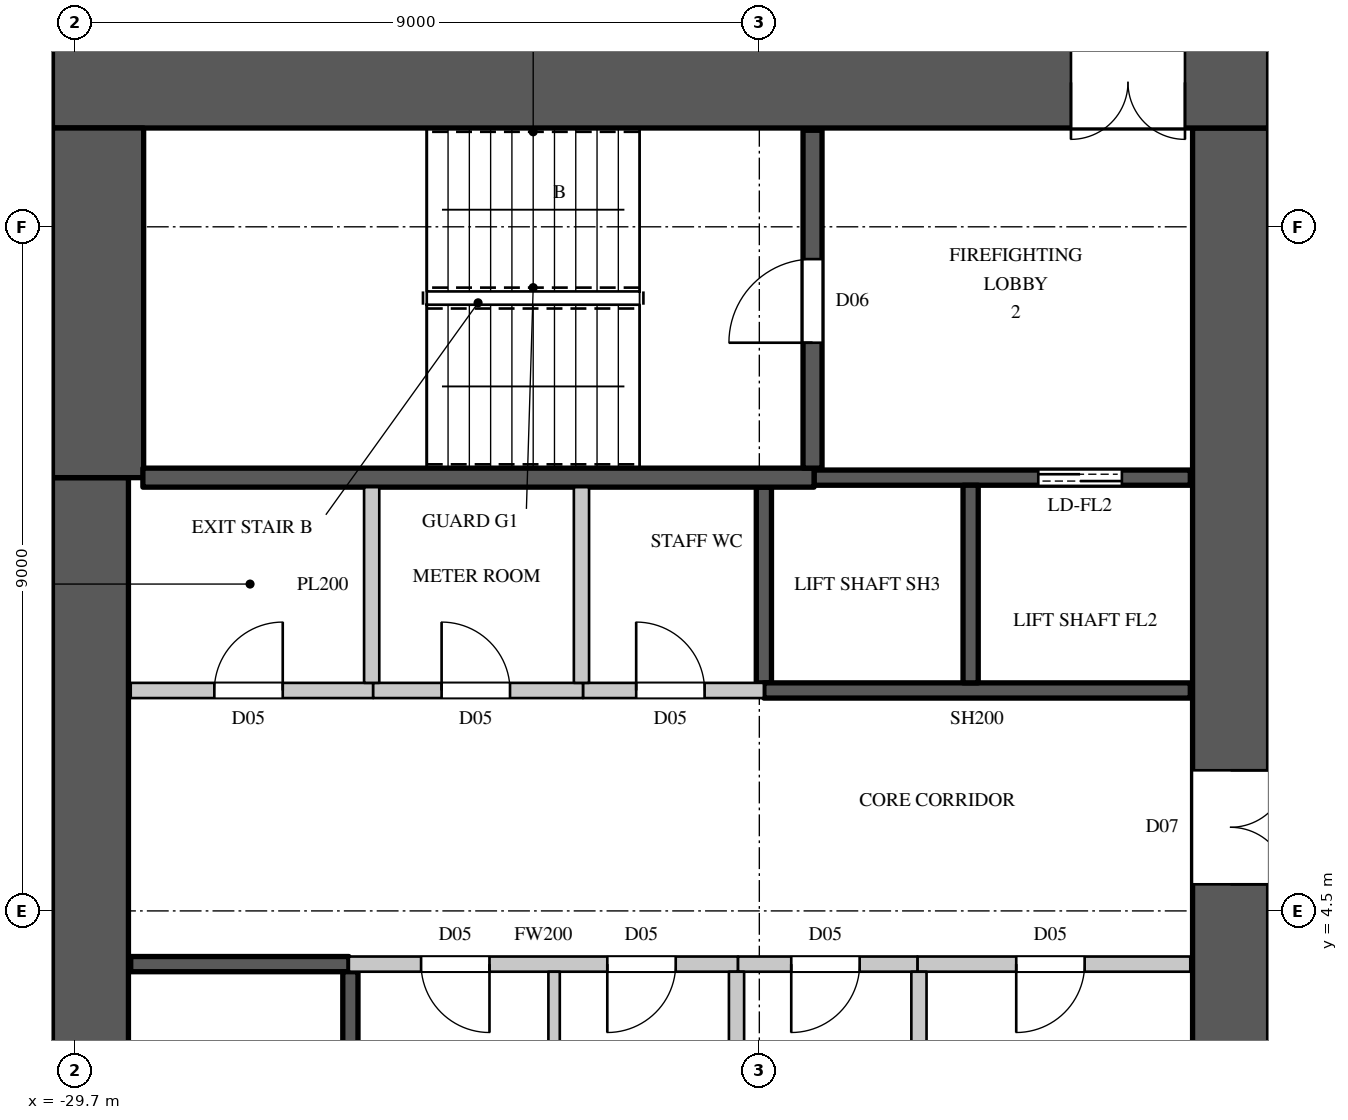
"""IFC4 building model, lengths in metres.
Left out: names, types, materials, properties, quantities, classifications, styles, units other than length and angle.
Written with IfcOpenShell. Run it as: python <this file> out.ifc"""

import sys

from ifc_helpers import new_model, si_unit, direction, frame, frame_2d, origin, place, context, subcontext, project, spatial, rectangle, extrude, element, fill, save


model = new_model("IFC4")
c1 = context("Model", 3, precision=1e-05, world=origin(), true_north=direction((0.0, 1.0)))
c2 = subcontext(c1, "Body", "Model", "MODEL_VIEW")
j1 = project(units=[si_unit("LENGTHUNIT", "METRE"), si_unit("PLANEANGLEUNIT", "RADIAN")], contexts=[c1])
p1 = place(None, origin())
s1 = spatial("IfcSite", under=j1, at=p1, CompositionType="ELEMENT")
p2 = place(p1, origin())
s2 = spatial("IfcBuilding", under=s1, at=p2, CompositionType="ELEMENT")
p3 = place(p2, frame((0.0, 0.0, 80.7)))
s3 = spatial("IfcBuildingStorey", under=s2, at=p3, CompositionType="ELEMENT", Elevation=80.7)
p4 = place(p3, frame((-30.0, 15.4, 0.0), z_axis=(0.0, 0.0, 1.0), x_axis=(1.0, 0.0, 0.0)))
e1 = element("IfcWall", 1, at=p4, inside=s3, PredefinedType="SHEAR", context=c2, shape_type="SweptSolid", body=[
    extrude(rectangle(XDim=16.0, YDim=1.2, at=frame_2d((8.0, 0.0))), origin(), (0.0, 0.0, 1.0), 3.6),
])
p5 = place(p4, frame((13.4, 0.0, 0.0)))
e2 = element("IfcOpeningElement", 2, at=p5, cuts=e1, PredefinedType="OPENING", context=c2, shape_type="SweptSolid", body=[
    extrude(rectangle(XDim=1.5, YDim=2.4, at=frame_2d((0.75, 1.2))), frame((0.0, 0.61, 0.0), z_axis=(0.0, -1.0, 0.0), x_axis=(1.0, 0.0, 0.0)), (0.0, 0.0, 1.0), 1.22),
])
p6 = place(p3, frame((-14.5, -14.8, 0.0), z_axis=(0.0, 0.0, 1.0), x_axis=(0.0, 1.0, 0.0)))
e3 = element("IfcWall", 3, at=p6, inside=s3, PredefinedType="SHEAR", context=c2, shape_type="SweptSolid", body=[
    extrude(rectangle(XDim=29.6, YDim=1.0, at=frame_2d((14.8, 0.0))), origin(), (0.0, 0.0, 1.0), 3.6),
])
p7 = place(p6, frame((8.45, 0.0, 0.0)))
e4 = element("IfcOpeningElement", 4, at=p7, cuts=e3, PredefinedType="OPENING", context=c2, shape_type="SweptSolid", body=[
    extrude(rectangle(XDim=1.5, YDim=2.4, at=frame_2d((0.75, 1.2))), frame((0.0, 0.51, 0.0), z_axis=(0.0, -1.0, 0.0), x_axis=(1.0, 0.0, 0.0)), (0.0, 0.0, 1.0), 1.02),
])
p8 = place(p6, frame((19.65, 0.0, 0.0)))
e5 = element("IfcOpeningElement", 5, at=p8, cuts=e3, PredefinedType="OPENING", context=c2, shape_type="SweptSolid", body=[
    extrude(rectangle(XDim=1.5, YDim=2.4, at=frame_2d((0.75, 1.2))), frame((0.0, 0.51, 0.0), z_axis=(0.0, -1.0, 0.0), x_axis=(1.0, 0.0, 0.0)), (0.0, 0.0, 1.0), 1.02),
])
p9 = place(p6, frame((14.5, 0.0, 0.0)))
e6 = element("IfcOpeningElement", 6, at=p9, cuts=e3, PredefinedType="OPENING", context=c2, shape_type="SweptSolid", body=[
    extrude(rectangle(XDim=0.6, YDim=2.0, at=frame_2d((0.3, 1.0))), frame((0.0, 0.51, 0.0), z_axis=(0.0, -1.0, 0.0), x_axis=(1.0, 0.0, 0.0)), (0.0, 0.0, 1.0), 1.02),
])
p10 = place(p3, frame((-29.5, -10.2, 0.0), z_axis=(0.0, 0.0, 1.0), x_axis=(0.0, 1.0, 0.0)))
e7 = element("IfcWall", 7, at=p10, inside=s3, PredefinedType="SHEAR", context=c2, shape_type="SweptSolid", body=[
    extrude(rectangle(XDim=20.4, YDim=1.0, at=frame_2d((10.2, 0.0))), origin(), (0.0, 0.0, 1.0), 3.6),
])
p11 = place(p3, frame((-29.4, 10.2, 0.0), z_axis=(0.0, 0.0, 1.0), x_axis=(0.0, 1.0, 0.0)))
e8 = element("IfcWall", 8, at=p11, inside=s3, PredefinedType="SHEAR", context=c2, shape_type="SweptSolid", body=[
    extrude(rectangle(XDim=4.6, YDim=1.2, at=frame_2d((2.3, 0.0))), origin(), (0.0, 0.0, 1.0), 3.6),
])
p12 = place(p3, frame((-28.97, 7.4, 0.0), z_axis=(0.0, 0.0, 1.0), x_axis=(1.0, 0.0, 0.0)))
e9 = element("IfcWall", 9, at=p12, inside=s3, PredefinedType="PARTITIONING", context=c2, shape_type="SweptSolid", body=[
    extrude(rectangle(XDim=3.19, YDim=0.2, at=frame_2d((1.595, 0.0))), origin(), (0.0, 0.0, 1.0), 3.3),
])
p13 = place(p12, frame((1.1, 0.0, 0.0)))
e10 = element("IfcOpeningElement", 10, at=p13, cuts=e9, PredefinedType="OPENING", context=c2, shape_type="SweptSolid", body=[
    extrude(rectangle(XDim=0.9, YDim=2.2, at=frame_2d((0.45, 1.1))), frame((0.0, 0.11, 0.0), z_axis=(0.0, -1.0, 0.0), x_axis=(1.0, 0.0, 0.0)), (0.0, 0.0, 1.0), 0.22),
])
p14 = place(p3, frame((-26.1, 3.8, 0.0), z_axis=(0.0, 0.0, 1.0), x_axis=(1.0, 0.0, 0.0)))
e11 = element("IfcWall", 11, at=p14, inside=s3, PredefinedType="PARTITIONING", context=c2, shape_type="SweptSolid", body=[
    extrude(rectangle(XDim=5.12, YDim=0.2, at=frame_2d((2.56, 0.0))), origin(), (0.0, 0.0, 1.0), 3.3),
])
p15 = place(p14, frame((0.95, 0.0, 0.0)))
e12 = element("IfcOpeningElement", 12, at=p15, cuts=e11, PredefinedType="OPENING", context=c2, shape_type="SweptSolid", body=[
    extrude(rectangle(XDim=0.9, YDim=2.2, at=frame_2d((0.45, 1.1))), frame((0.0, 0.11, 0.0), z_axis=(0.0, -1.0, 0.0), x_axis=(1.0, 0.0, 0.0)), (0.0, 0.0, 1.0), 0.22),
])
p16 = place(p14, frame((3.4, 0.0, 0.0)))
e13 = element("IfcOpeningElement", 13, at=p16, cuts=e11, PredefinedType="OPENING", context=c2, shape_type="SweptSolid", body=[
    extrude(rectangle(XDim=0.9, YDim=2.2, at=frame_2d((0.45, 1.1))), frame((0.0, 0.11, 0.0), z_axis=(0.0, -1.0, 0.0), x_axis=(1.0, 0.0, 0.0)), (0.0, 0.0, 1.0), 0.22),
])
p17 = place(p3, frame((-23.02, 7.4, 0.0), z_axis=(0.0, 0.0, 1.0), x_axis=(1.0, 0.0, 0.0)))
e14 = element("IfcWall", 14, at=p17, inside=s3, PredefinedType="PARTITIONING", context=c2, shape_type="SweptSolid", body=[
    extrude(rectangle(XDim=2.38, YDim=0.2, at=frame_2d((1.19, 0.0))), origin(), (0.0, 0.0, 1.0), 3.3),
])
p18 = place(p17, frame((0.7, 0.0, 0.0)))
e15 = element("IfcOpeningElement", 15, at=p18, cuts=e14, PredefinedType="OPENING", context=c2, shape_type="SweptSolid", body=[
    extrude(rectangle(XDim=0.9, YDim=2.2, at=frame_2d((0.45, 1.1))), frame((0.0, 0.11, 0.0), z_axis=(0.0, -1.0, 0.0), x_axis=(1.0, 0.0, 0.0)), (0.0, 0.0, 1.0), 0.22),
])
p19 = place(p3, frame((-18.62, 3.8, 0.0), z_axis=(0.0, 0.0, 1.0), x_axis=(1.0, 0.0, 0.0)))
e16 = element("IfcWall", 16, at=p19, inside=s3, PredefinedType="PARTITIONING", context=c2, shape_type="SweptSolid", body=[
    extrude(rectangle(XDim=3.59, YDim=0.2, at=frame_2d((1.795, 0.0))), origin(), (0.0, 0.0, 1.0), 3.3),
])
p20 = place(p19, frame((1.3, 0.0, 0.0)))
e17 = element("IfcOpeningElement", 17, at=p20, cuts=e16, PredefinedType="OPENING", context=c2, shape_type="SweptSolid", body=[
    extrude(rectangle(XDim=0.9, YDim=2.2, at=frame_2d((0.45, 1.1))), frame((0.0, 0.11, 0.0), z_axis=(0.0, -1.0, 0.0), x_axis=(1.0, 0.0, 0.0)), (0.0, 0.0, 1.0), 0.22),
])
p21 = place(p3, frame((-23.4, 1.1, 0.0), z_axis=(0.0, 0.0, 1.0), x_axis=(0.0, 1.0, 0.0)))
e18 = element("IfcWall", 18, at=p21, inside=s3, PredefinedType="PARTITIONING", context=c2, shape_type="SweptSolid", body=[
    extrude(rectangle(XDim=2.6, YDim=0.15, at=frame_2d((1.3, 0.0))), origin(), (0.0, 0.0, 1.0), 3.3),
])
p22 = place(p3, frame((-25.78, 7.4, 0.0), z_axis=(0.0, 0.0, 1.0), x_axis=(1.0, 0.0, 0.0)))
e19 = element("IfcWall", 19, at=p22, inside=s3, PredefinedType="PARTITIONING", context=c2, shape_type="SweptSolid", body=[
    extrude(rectangle(XDim=2.76, YDim=0.2, at=frame_2d((1.38, 0.0))), origin(), (0.0, 0.0, 1.0), 3.3),
])
p23 = place(p22, frame((0.9, 0.0, 0.0)))
e20 = element("IfcOpeningElement", 20, at=p23, cuts=e19, PredefinedType="OPENING", context=c2, shape_type="SweptSolid", body=[
    extrude(rectangle(XDim=0.9, YDim=2.2, at=frame_2d((0.45, 1.1))), frame((0.0, 0.11, 0.0), z_axis=(0.0, -1.0, 0.0), x_axis=(1.0, 0.0, 0.0)), (0.0, 0.0, 1.0), 0.22),
])
for number, where, z_axis, x_axis in (
    (21, (-25.8, 7.5, 0.0), (0.0, 0.0, 1.0), (0.0, 1.0, 0.0)),
    (22, (-23.04, 7.5, 0.0), (0.0, 0.0, 1.0), (0.0, 1.0, 0.0)),
):
    element("IfcWall", number, at=place(p3, frame(where, z_axis=z_axis, x_axis=x_axis)), inside=s3, PredefinedType="PARTITIONING", context=c2, shape_type="SweptSolid", body=[
        extrude(rectangle(XDim=2.575, YDim=0.2, at=frame_2d((1.288, 0.0))), origin(), (0.0, 0.0, 1.0), 3.3),
    ])
p24 = place(p3, frame((-20.98, 3.8, 0.0), z_axis=(0.0, 0.0, 1.0), x_axis=(1.0, 0.0, 0.0)))
e23 = element("IfcWall", 23, at=p24, inside=s3, PredefinedType="PARTITIONING", context=c2, shape_type="SweptSolid", body=[
    extrude(rectangle(XDim=2.36, YDim=0.2, at=frame_2d((1.18, 0.0))), origin(), (0.0, 0.0, 1.0), 3.3),
])
p25 = place(p24, frame((0.7, 0.0, 0.0)))
e24 = element("IfcOpeningElement", 24, at=p25, cuts=e23, PredefinedType="OPENING", context=c2, shape_type="SweptSolid", body=[
    extrude(rectangle(XDim=0.9, YDim=2.2, at=frame_2d((0.45, 1.1))), frame((0.0, 0.11, 0.0), z_axis=(0.0, -1.0, 0.0), x_axis=(1.0, 0.0, 0.0)), (0.0, 0.0, 1.0), 0.22),
])
for number, where, z_axis, x_axis in (
    (25, (-21.0, 1.1, 0.0), (0.0, 0.0, 1.0), (0.0, 1.0, 0.0)),
    (26, (-18.6, 1.1, 0.0), (0.0, 0.0, 1.0), (0.0, 1.0, 0.0)),
):
    element("IfcWall", number, at=place(p3, frame(where, z_axis=z_axis, x_axis=x_axis)), inside=s3, PredefinedType="PARTITIONING", context=c2, shape_type="SweptSolid", body=[
        extrude(rectangle(XDim=2.6, YDim=0.2, at=frame_2d((1.3, 0.0))), origin(), (0.0, 0.0, 1.0), 3.3),
    ])
p26 = place(p3, frame((-28.97, 3.8, 0.0), z_axis=(0.0, 0.0, 1.0), x_axis=(1.0, 0.0, 0.0)))
e27 = element("IfcWall", 27, at=p26, inside=s3, PredefinedType="SHEAR", context=c2, shape_type="SweptSolid", body=[
    extrude(rectangle(XDim=2.87, YDim=0.2, at=frame_2d((1.435, 0.0))), origin(), (0.0, 0.0, 1.0), 3.3),
])
p27 = place(p3, frame((-26.08, 1.1, 0.0), z_axis=(0.0, 0.0, 1.0), x_axis=(0.0, 1.0, 0.0)))
e28 = element("IfcWall", 28, at=p27, inside=s3, PredefinedType="SHEAR", context=c2, shape_type="SweptSolid", body=[
    extrude(rectangle(XDim=2.6, YDim=0.2, at=frame_2d((1.3, 0.0))), origin(), (0.0, 0.0, 1.0), 3.3),
])
p28 = place(p3, frame((-20.64, 7.5, 0.0), z_axis=(0.0, 0.0, 1.0), x_axis=(0.0, 1.0, 0.0)))
e29 = element("IfcWall", 29, at=p28, inside=s3, PredefinedType="SHEAR", context=c2, shape_type="SweptSolid", body=[
    extrude(rectangle(XDim=2.575, YDim=0.2, at=frame_2d((1.288, 0.0))), origin(), (0.0, 0.0, 1.0), 3.3),
])
p29 = place(p3, frame((-20.64, 7.4, 0.0), z_axis=(0.0, 0.0, 1.0), x_axis=(1.0, 0.0, 0.0)))
e30 = element("IfcWall", 30, at=p29, inside=s3, PredefinedType="SHEAR", context=c2, shape_type="SweptSolid", body=[
    extrude(rectangle(XDim=5.61, YDim=0.2, at=frame_2d((2.805, 0.0))), origin(), (0.0, 0.0, 1.0), 3.3),
])
p30 = place(p3, frame((-19.98, 10.2, 0.0), z_axis=(0.0, 0.0, 1.0), x_axis=(1.0, 0.0, 0.0)))
e31 = element("IfcWall", 31, at=p30, inside=s3, PredefinedType="SHEAR", context=c2, shape_type="SweptSolid", body=[
    extrude(rectangle(XDim=4.95, YDim=0.2, at=frame_2d((2.475, 0.0))), origin(), (0.0, 0.0, 1.0), 3.3),
])
p31 = place(p30, frame((2.95, 0.0, 0.0)))
e32 = element("IfcOpeningElement", 32, at=p31, cuts=e31, PredefinedType="OPENING", context=c2, shape_type="SweptSolid", body=[
    extrude(rectangle(XDim=1.1, YDim=2.2, at=frame_2d((0.55, 1.1))), frame((0.0, 0.11, 0.0), z_axis=(0.0, -1.0, 0.0), x_axis=(1.0, 0.0, 0.0)), (0.0, 0.0, 1.0), 0.22),
])
p32 = place(p3, frame((-17.92, 7.5, 0.0), z_axis=(0.0, 0.0, 1.0), x_axis=(0.0, 1.0, 0.0)))
e33 = element("IfcWall", 33, at=p32, inside=s3, PredefinedType="SHEAR", context=c2, shape_type="SweptSolid", body=[
    extrude(rectangle(XDim=2.6, YDim=0.2, at=frame_2d((1.3, 0.0))), origin(), (0.0, 0.0, 1.0), 3.6),
])
p33 = place(p3, frame((-28.81, 10.2, 0.0), z_axis=(0.0, 0.0, 1.0), x_axis=(1.0, 0.0, 0.0)))
e34 = element("IfcWall", 34, at=p33, inside=s3, PredefinedType="SHEAR", context=c2, shape_type="SweptSolid", body=[
    extrude(rectangle(XDim=8.83, YDim=0.25, at=frame_2d((4.415, 0.0))), origin(), (0.0, 0.0, 1.0), 3.3),
])
p34 = place(p3, frame((-20.0, 10.325, 0.0), z_axis=(0.0, 0.0, 1.0), x_axis=(0.0, 1.0, 0.0)))
e35 = element("IfcWall", 35, at=p34, inside=s3, PredefinedType="SHEAR", context=c2, shape_type="SweptSolid", body=[
    extrude(rectangle(XDim=4.445, YDim=0.25, at=frame_2d((2.223, 0.0))), origin(), (0.0, 0.0, 1.0), 3.3),
])
p35 = place(p34, frame((1.65, 0.0, 0.0)))
e36 = element("IfcOpeningElement", 36, at=p35, cuts=e35, PredefinedType="OPENING", context=c2, shape_type="SweptSolid", body=[
    extrude(rectangle(XDim=1.1, YDim=2.2, at=frame_2d((0.55, 1.1))), frame((0.0, 0.135, 0.0), z_axis=(0.0, -1.0, 0.0), x_axis=(1.0, 0.0, 0.0)), (0.0, 0.0, 1.0), 0.27),
])
p36 = place(p35, origin())
e37 = element("IfcDoor", 37, at=p36, inside=s3, OperationType="SINGLE_SWING_LEFT", PredefinedType="DOOR", context=c2, shape_type="SweptSolid", body=[
    extrude(rectangle(XDim=1.1, YDim=2.2, at=frame_2d((0.55, 1.1))), frame((0.0, 0.025, 0.0), z_axis=(0.0, -1.0, 0.0), x_axis=(1.0, 0.0, 0.0)), (0.0, 0.0, 1.0), 0.05),
])
fill(e36, e37)
p37 = place(p15, origin())
e38 = element("IfcDoor", 38, at=p37, inside=s3, OperationType="SINGLE_SWING_LEFT", PredefinedType="DOOR", context=c2, shape_type="SweptSolid", body=[
    extrude(rectangle(XDim=0.9, YDim=2.2, at=frame_2d((0.45, 1.1))), frame((0.0, 0.025, 0.0), z_axis=(0.0, -1.0, 0.0), x_axis=(1.0, 0.0, 0.0)), (0.0, 0.0, 1.0), 0.05),
])
fill(e12, e38)
p38 = place(p16, origin())
e39 = element("IfcDoor", 39, at=p38, inside=s3, OperationType="SINGLE_SWING_RIGHT", PredefinedType="DOOR", context=c2, shape_type="SweptSolid", body=[
    extrude(rectangle(XDim=0.9, YDim=2.2, at=frame_2d((0.45, 1.1))), frame((0.0, 0.025, 0.0), z_axis=(0.0, -1.0, 0.0), x_axis=(1.0, 0.0, 0.0)), (0.0, 0.0, 1.0), 0.05),
])
fill(e13, e39)
p39 = place(p25, origin())
e40 = element("IfcDoor", 40, at=p39, inside=s3, OperationType="SINGLE_SWING_RIGHT", PredefinedType="DOOR", context=c2, shape_type="SweptSolid", body=[
    extrude(rectangle(XDim=0.9, YDim=2.2, at=frame_2d((0.45, 1.1))), frame((0.0, 0.025, 0.0), z_axis=(0.0, -1.0, 0.0), x_axis=(1.0, 0.0, 0.0)), (0.0, 0.0, 1.0), 0.05),
])
fill(e24, e40)
p40 = place(p20, origin())
e41 = element("IfcDoor", 41, at=p40, inside=s3, OperationType="SINGLE_SWING_RIGHT", PredefinedType="DOOR", context=c2, shape_type="SweptSolid", body=[
    extrude(rectangle(XDim=0.9, YDim=2.2, at=frame_2d((0.45, 1.1))), frame((0.0, 0.025, 0.0), z_axis=(0.0, -1.0, 0.0), x_axis=(1.0, 0.0, 0.0)), (0.0, 0.0, 1.0), 0.05),
])
fill(e17, e41)
p41 = place(p13, origin())
e42 = element("IfcDoor", 42, at=p41, inside=s3, OperationType="SINGLE_SWING_RIGHT", PredefinedType="DOOR", context=c2, shape_type="SweptSolid", body=[
    extrude(rectangle(XDim=0.9, YDim=2.2, at=frame_2d((0.45, 1.1))), frame((0.0, 0.025, 0.0), z_axis=(0.0, -1.0, 0.0), x_axis=(1.0, 0.0, 0.0)), (0.0, 0.0, 1.0), 0.05),
])
fill(e10, e42)
p42 = place(p23, origin())
e43 = element("IfcDoor", 43, at=p42, inside=s3, OperationType="SINGLE_SWING_LEFT", PredefinedType="DOOR", context=c2, shape_type="SweptSolid", body=[
    extrude(rectangle(XDim=0.9, YDim=2.2, at=frame_2d((0.45, 1.1))), frame((0.0, 0.025, 0.0), z_axis=(0.0, -1.0, 0.0), x_axis=(1.0, 0.0, 0.0)), (0.0, 0.0, 1.0), 0.05),
])
fill(e20, e43)
p43 = place(p18, origin())
e44 = element("IfcDoor", 44, at=p43, inside=s3, OperationType="SINGLE_SWING_LEFT", PredefinedType="DOOR", context=c2, shape_type="SweptSolid", body=[
    extrude(rectangle(XDim=0.9, YDim=2.2, at=frame_2d((0.45, 1.1))), frame((0.0, 0.025, 0.0), z_axis=(0.0, -1.0, 0.0), x_axis=(1.0, 0.0, 0.0)), (0.0, 0.0, 1.0), 0.05),
])
fill(e15, e44)
p44 = place(p31, origin())
e45 = element("IfcDoor", 45, at=p44, inside=s3, OperationType="DOUBLE_DOOR_SLIDING", PredefinedType="DOOR", context=c2, shape_type="SweptSolid", body=[
    extrude(rectangle(XDim=1.1, YDim=2.2, at=frame_2d((0.55, 1.1))), frame((0.0, 0.025, 0.0), z_axis=(0.0, -1.0, 0.0), x_axis=(1.0, 0.0, 0.0)), (0.0, 0.0, 1.0), 0.05),
])
fill(e32, e45)
p45 = place(p5, origin())
e46 = element("IfcDoor", 46, at=p45, inside=s3, OperationType="DOUBLE_DOOR_SINGLE_SWING", PredefinedType="DOOR", context=c2, shape_type="SweptSolid", body=[
    extrude(rectangle(XDim=1.5, YDim=2.4, at=frame_2d((0.75, 1.2))), frame((0.0, 0.025, 0.0), z_axis=(0.0, -1.0, 0.0), x_axis=(1.0, 0.0, 0.0)), (0.0, 0.0, 1.0), 0.05),
])
fill(e2, e46)
p46 = place(p8, origin())
e47 = element("IfcDoor", 47, at=p46, inside=s3, OperationType="DOUBLE_DOOR_SINGLE_SWING", PredefinedType="DOOR", context=c2, shape_type="SweptSolid", body=[
    extrude(rectangle(XDim=1.5, YDim=2.4, at=frame_2d((0.75, 1.2))), frame((0.0, -0.445, 0.0), z_axis=(0.0, -1.0, 0.0), x_axis=(1.0, 0.0, 0.0)), (0.0, 0.0, 1.0), 0.05),
])
fill(e5, e47)
save(model, sys.argv[1])
